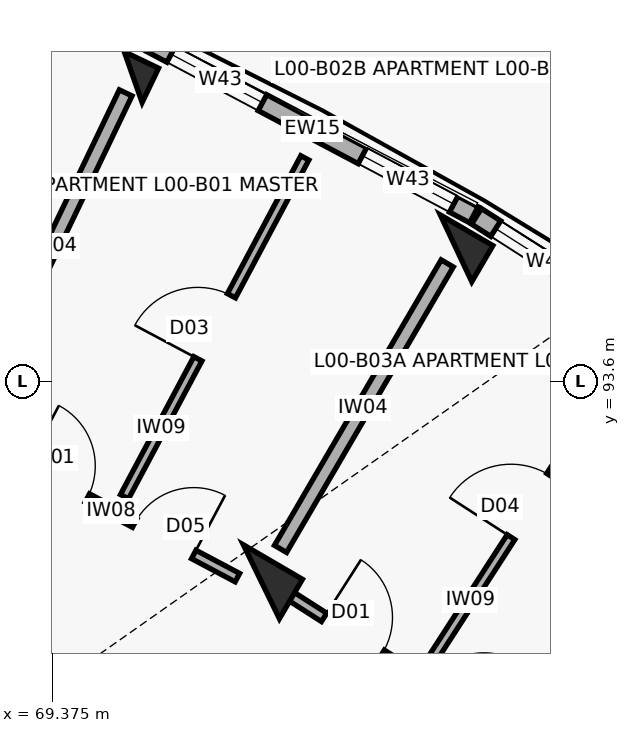
"""IFC4 building model, lengths in metres.
Left out: names, types, materials, properties, quantities, classifications, styles, units other than length and angle.
Written with IfcOpenShell. Run it as: python <this file> out.ifc"""

import sys

from ifc_helpers import new_model, si_unit, direction, frame, frame_2d, origin, origin_2d, place, context, subcontext, project, spatial, rectangle, extrude, element, fill, save


model = new_model("IFC4")
c1 = context("Model", 3, precision=1e-05, world=origin(), true_north=direction((0.0, 1.0)))
c2 = subcontext(c1, "Body", "Model", "MODEL_VIEW")
j1 = project(units=[si_unit("LENGTHUNIT", "METRE"), si_unit("PLANEANGLEUNIT", "RADIAN")], contexts=[c1])
p1 = place(None, origin())
s1 = spatial("IfcSite", under=j1, at=p1, CompositionType="ELEMENT")
p2 = place(p1, origin())
s2 = spatial("IfcBuilding", under=s1, at=p2, CompositionType="ELEMENT")
p3 = place(p2, origin())
s3 = spatial("IfcBuildingStorey", under=s2, at=p3, CompositionType="ELEMENT", Elevation=0.0)
p4 = place(p3, frame((70.441, 97.6, 0.0), z_axis=(0.0, 0.0, 1.0), x_axis=(0.432085748802, 0.901832526405, 0.0)))
e1 = element("IfcColumn", 1, at=p4, inside=s3, PredefinedType="COLUMN", context=c2, shape_type="SweptSolid", body=[
    extrude(rectangle(XDim=0.5, YDim=0.5, at=origin_2d()), origin(), (0.0, 0.0, 1.0), 4.5),
])
p5 = place(p3, frame((72.127, 90.96, 0.0), z_axis=(0.0, 0.0, 1.0), x_axis=(0.504226211181, 0.863571611366, 0.0)))
e2 = element("IfcColumn", 2, at=p5, inside=s3, PredefinedType="COLUMN", context=c2, shape_type="SweptSolid", body=[
    extrude(rectangle(XDim=0.6, YDim=0.9, at=origin_2d()), origin(), (0.0, 0.0, 1.0), 4.5),
])
p6 = place(p3, frame((74.689, 95.347, 0.0), z_axis=(0.0, 0.0, 1.0), x_axis=(0.504226211181, 0.863571611366, 0.0)))
e3 = element("IfcColumn", 3, at=p6, inside=s3, PredefinedType="COLUMN", context=c2, shape_type="SweptSolid", body=[
    extrude(rectangle(XDim=0.55, YDim=0.8, at=origin_2d()), origin(), (0.0, 0.0, 1.0), 4.5),
])
p7 = place(p3, frame((70.675, 98.042, 0.0), z_axis=(0.0, 0.0, 1.0), x_axis=(0.883448093208, -0.468529045639, 0.0)))
e4 = element("IfcWall", 4, at=p7, inside=s3, PredefinedType="SOLIDWALL", context=c2, shape_type="SweptSolid", body=[
    extrude(rectangle(XDim=4.809, YDim=0.238, at=frame_2d((2.405, 0.0))), origin(), (0.0, 0.0, 1.0), 3.45),
])
p8 = place(p7, frame((0.3, 0.0, 0.3)))
e5 = element("IfcOpeningElement", 5, at=p8, cuts=e4, PredefinedType="OPENING", context=c2, shape_type="SweptSolid", body=[
    extrude(rectangle(XDim=1.36, YDim=1.42, at=frame_2d((0.68, 0.71))), frame((0.0, 0.129, 0.0), z_axis=(0.0, -1.0, 0.0), x_axis=(1.0, 0.0, 0.0)), (0.0, 0.0, 1.0), 0.258),
])
p9 = place(p7, frame((3.149, 0.0, 0.3)))
e6 = element("IfcOpeningElement", 6, at=p9, cuts=e4, PredefinedType="OPENING", context=c2, shape_type="SweptSolid", body=[
    extrude(rectangle(XDim=1.36, YDim=1.42, at=frame_2d((0.68, 0.71))), frame((0.0, 0.129, 0.0), z_axis=(0.0, -1.0, 0.0), x_axis=(1.0, 0.0, 0.0)), (0.0, 0.0, 1.0), 0.258),
])
p10 = place(p3, frame((74.958, 95.768, 0.0), z_axis=(0.0, 0.0, 1.0), x_axis=(0.84226218024, -0.539068103061, 0.0)))
e7 = element("IfcWall", 7, at=p10, inside=s3, PredefinedType="SOLIDWALL", context=c2, shape_type="SweptSolid", body=[
    extrude(rectangle(XDim=4.809, YDim=0.242, at=frame_2d((2.404, 0.0))), origin(), (0.0, 0.0, 1.0), 3.45),
])
p11 = place(p10, frame((0.3, 0.0, 0.3)))
e8 = element("IfcOpeningElement", 8, at=p11, cuts=e7, PredefinedType="OPENING", context=c2, shape_type="SweptSolid", body=[
    extrude(rectangle(XDim=1.36, YDim=1.56, at=frame_2d((0.68, 0.78))), frame((0.0, 0.131, 0.0), z_axis=(0.0, -1.0, 0.0), x_axis=(1.0, 0.0, 0.0)), (0.0, 0.0, 1.0), 0.262),
])
p12 = place(p10, frame((3.149, 0.0, 0.3)))
e9 = element("IfcOpeningElement", 9, at=p12, cuts=e7, PredefinedType="OPENING", context=c2, shape_type="SweptSolid", body=[
    extrude(rectangle(XDim=1.36, YDim=1.56, at=frame_2d((0.68, 0.78))), frame((0.0, 0.131, 0.0), z_axis=(0.0, -1.0, 0.0), x_axis=(1.0, 0.0, 0.0)), (0.0, 0.0, 1.0), 0.262),
])
p13 = place(p3, frame((67.194, 90.014, 0.0), z_axis=(0.0, 0.0, 1.0), x_axis=(0.883410853063, -0.468599258099, 0.0)))
e10 = element("IfcWall", 10, at=p13, inside=s3, PredefinedType="SOLIDWALL", context=c2, shape_type="SweptSolid", body=[
    extrude(rectangle(XDim=3.436, YDim=0.2, at=frame_2d((1.718, 0.0))), origin(), (0.0, 0.0, 1.0), 3.34),
])
p14 = place(p13, frame((1.208, 0.0, 0.0)))
e11 = element("IfcOpeningElement", 11, at=p14, cuts=e10, PredefinedType="OPENING", context=c2, shape_type="SweptSolid", body=[
    extrude(rectangle(XDim=1.02, YDim=2.15, at=frame_2d((0.51, 1.075))), frame((0.0, 0.11, 0.0), z_axis=(0.0, -1.0, 0.0), x_axis=(1.0, 0.0, 0.0)), (0.0, 0.0, 1.0), 0.22),
])
p15 = place(p3, frame((68.468, 92.788, 0.0), z_axis=(0.0, 0.0, 1.0), x_axis=(0.883450371448, -0.468524749814, 0.0)))
e12 = element("IfcWall", 12, at=p15, inside=s3, PredefinedType="PARTITIONING", context=c2, shape_type="SweptSolid", body=[
    extrude(rectangle(XDim=3.785, YDim=0.125, at=frame_2d((1.893, 0.0))), origin(), (0.0, 0.0, 1.0), 3.34),
])
p16 = place(p15, frame((0.65, 0.0, 0.0)))
e13 = element("IfcOpeningElement", 13, at=p16, cuts=e12, PredefinedType="OPENING", context=c2, shape_type="SweptSolid", body=[
    extrude(rectangle(XDim=0.9, YDim=2.1, at=frame_2d((0.45, 1.05))), frame((0.0, 0.073, 0.0), z_axis=(0.0, -1.0, 0.0), x_axis=(1.0, 0.0, 0.0)), (0.0, 0.0, 1.0), 0.145),
])
p17 = place(p15, frame((2.255, 0.0, 0.0)))
e14 = element("IfcOpeningElement", 14, at=p17, cuts=e12, PredefinedType="OPENING", context=c2, shape_type="SweptSolid", body=[
    extrude(rectangle(XDim=0.88, YDim=2.1, at=frame_2d((0.44, 1.05))), frame((0.0, 0.073, 0.0), z_axis=(0.0, -1.0, 0.0), x_axis=(1.0, 0.0, 0.0)), (0.0, 0.0, 1.0), 0.145),
])
p18 = place(p3, frame((70.326, 92.079, 0.0), z_axis=(0.0, 0.0, 1.0), x_axis=(0.469847866249, 0.882747405876, 0.0)))
e15 = element("IfcWall", 15, at=p18, inside=s3, PredefinedType="PARTITIONING", context=c2, shape_type="SweptSolid", body=[
    extrude(rectangle(XDim=5.05, YDim=0.12, at=frame_2d((2.525, 0.0))), origin(), (0.0, 0.0, 1.0), 3.34),
])
p19 = place(p18, frame((2.055, 0.0, 0.0)))
e16 = element("IfcOpeningElement", 16, at=p19, cuts=e15, PredefinedType="OPENING", context=c2, shape_type="SweptSolid", body=[
    extrude(rectangle(XDim=0.94, YDim=2.1, at=frame_2d((0.47, 1.05))), frame((0.0, 0.07, 0.0), z_axis=(0.0, -1.0, 0.0), x_axis=(1.0, 0.0, 0.0)), (0.0, 0.0, 1.0), 0.14),
])
p20 = place(p3, frame((68.462, 93.469, 0.0), z_axis=(0.0, 0.0, 1.0), x_axis=(0.432086898897, 0.901831975371, 0.0)))
e17 = element("IfcWall", 17, at=p20, inside=s3, PredefinedType="SOLIDWALL", context=c2, shape_type="SweptSolid", body=[
    extrude(rectangle(XDim=4.35, YDim=0.185, at=frame_2d((2.175, 0.0))), origin(), (0.0, 0.0, 1.0), 3.34),
])
p21 = place(p3, frame((72.405, 90.842, 0.0), z_axis=(0.0, 0.0, 1.0), x_axis=(0.842271400662, -0.539053696423, 0.0)))
e18 = element("IfcWall", 18, at=p21, inside=s3, PredefinedType="PARTITIONING", context=c2, shape_type="SweptSolid", body=[
    extrude(rectangle(XDim=3.797, YDim=0.13, at=frame_2d((1.898, 0.0))), origin(), (0.0, 0.0, 1.0), 3.34),
])
p22 = place(p21, frame((0.65, 0.0, 0.0)))
e19 = element("IfcOpeningElement", 19, at=p22, cuts=e18, PredefinedType="OPENING", context=c2, shape_type="SweptSolid", body=[
    extrude(rectangle(XDim=0.9, YDim=2.1, at=frame_2d((0.45, 1.05))), frame((0.0, 0.075, 0.0), z_axis=(0.0, -1.0, 0.0), x_axis=(1.0, 0.0, 0.0)), (0.0, 0.0, 1.0), 0.15),
])
p23 = place(p21, frame((2.267, 0.0, 0.0)))
e20 = element("IfcOpeningElement", 20, at=p23, cuts=e18, PredefinedType="OPENING", context=c2, shape_type="SweptSolid", body=[
    extrude(rectangle(XDim=0.88, YDim=2.1, at=frame_2d((0.44, 1.05))), frame((0.0, 0.075, 0.0), z_axis=(0.0, -1.0, 0.0), x_axis=(1.0, 0.0, 0.0)), (0.0, 0.0, 1.0), 0.15),
])
p24 = place(p3, frame((74.342, 89.892, 0.0), z_axis=(0.0, 0.0, 1.0), x_axis=(0.542871109654, 0.839816026462, 0.0)))
e21 = element("IfcWall", 21, at=p24, inside=s3, PredefinedType="PARTITIONING", context=c2, shape_type="SweptSolid", body=[
    extrude(rectangle(XDim=4.9, YDim=0.12, at=frame_2d((2.45, 0.0))), origin(), (0.0, 0.0, 1.0), 3.34),
])
p25 = place(p24, frame((1.97, 0.0, 0.0)))
e22 = element("IfcOpeningElement", 22, at=p25, cuts=e21, PredefinedType="OPENING", context=c2, shape_type="SweptSolid", body=[
    extrude(rectangle(XDim=0.96, YDim=2.1, at=frame_2d((0.48, 1.05))), frame((0.0, 0.07, 0.0), z_axis=(0.0, -1.0, 0.0), x_axis=(1.0, 0.0, 0.0)), (0.0, 0.0, 1.0), 0.14),
])
p26 = place(p3, frame((72.379, 91.392, 0.0), z_axis=(0.0, 0.0, 1.0), x_axis=(0.504216452091, 0.863577309475, 0.0)))
e23 = element("IfcWall", 23, at=p26, inside=s3, PredefinedType="SOLIDWALL", context=c2, shape_type="SweptSolid", body=[
    extrude(rectangle(XDim=4.35, YDim=0.185, at=frame_2d((2.175, 0.0))), origin(), (0.0, 0.0, 1.0), 3.34),
])
p27 = place(p8, origin())
e24 = element("IfcWindow", 24, at=p27, inside=s3, PartitioningType="DOUBLE_PANEL_VERTICAL", PredefinedType="WINDOW", context=c2, shape_type="SweptSolid", body=[
    extrude(rectangle(XDim=1.36, YDim=1.42, at=frame_2d((0.68, 0.71))), frame((0.0, 0.03, 0.0), z_axis=(0.0, -1.0, 0.0), x_axis=(1.0, 0.0, 0.0)), (0.0, 0.0, 1.0), 0.06),
])
fill(e5, e24)
p28 = place(p9, origin())
e25 = element("IfcWindow", 25, at=p28, inside=s3, PartitioningType="DOUBLE_PANEL_VERTICAL", PredefinedType="WINDOW", context=c2, shape_type="SweptSolid", body=[
    extrude(rectangle(XDim=1.36, YDim=1.42, at=frame_2d((0.68, 0.71))), frame((0.0, 0.03, 0.0), z_axis=(0.0, -1.0, 0.0), x_axis=(1.0, 0.0, 0.0)), (0.0, 0.0, 1.0), 0.06),
])
fill(e6, e25)
p29 = place(p11, origin())
e26 = element("IfcWindow", 26, at=p29, inside=s3, PartitioningType="DOUBLE_PANEL_VERTICAL", PredefinedType="WINDOW", context=c2, shape_type="SweptSolid", body=[
    extrude(rectangle(XDim=1.36, YDim=1.56, at=frame_2d((0.68, 0.78))), frame((0.0, 0.03, 0.0), z_axis=(0.0, -1.0, 0.0), x_axis=(1.0, 0.0, 0.0)), (0.0, 0.0, 1.0), 0.06),
])
fill(e8, e26)
p30 = place(p16, origin())
e27 = element("IfcDoor", 27, at=p30, inside=s3, OperationType="SINGLE_SWING_LEFT", PredefinedType="DOOR", context=c2, shape_type="SweptSolid", body=[
    extrude(rectangle(XDim=0.9, YDim=2.1, at=frame_2d((0.45, 1.05))), frame((0.0, 0.025, 0.0), z_axis=(0.0, -1.0, 0.0), x_axis=(1.0, 0.0, 0.0)), (0.0, 0.0, 1.0), 0.05),
])
fill(e13, e27)
p31 = place(p17, origin())
e28 = element("IfcDoor", 28, at=p31, inside=s3, OperationType="SINGLE_SWING_RIGHT", PredefinedType="DOOR", context=c2, shape_type="SweptSolid", body=[
    extrude(rectangle(XDim=0.88, YDim=2.1, at=frame_2d((0.44, 1.05))), frame((0.0, 0.025, 0.0), z_axis=(0.0, -1.0, 0.0), x_axis=(1.0, 0.0, 0.0)), (0.0, 0.0, 1.0), 0.05),
])
fill(e14, e28)
p32 = place(p19, origin())
e29 = element("IfcDoor", 29, at=p32, inside=s3, OperationType="SINGLE_SWING_LEFT", PredefinedType="DOOR", context=c2, shape_type="SweptSolid", body=[
    extrude(rectangle(XDim=0.94, YDim=2.1, at=frame_2d((0.47, 1.05))), frame((0.0, 0.025, 0.0), z_axis=(0.0, -1.0, 0.0), x_axis=(1.0, 0.0, 0.0)), (0.0, 0.0, 1.0), 0.05),
])
fill(e16, e29)
p33 = place(p22, origin())
e30 = element("IfcDoor", 30, at=p33, inside=s3, OperationType="SINGLE_SWING_LEFT", PredefinedType="DOOR", context=c2, shape_type="SweptSolid", body=[
    extrude(rectangle(XDim=0.9, YDim=2.1, at=frame_2d((0.45, 1.05))), frame((0.0, 0.025, 0.0), z_axis=(0.0, -1.0, 0.0), x_axis=(1.0, 0.0, 0.0)), (0.0, 0.0, 1.0), 0.05),
])
fill(e19, e30)
p34 = place(p25, origin())
e31 = element("IfcDoor", 31, at=p34, inside=s3, OperationType="SINGLE_SWING_LEFT", PredefinedType="DOOR", context=c2, shape_type="SweptSolid", body=[
    extrude(rectangle(XDim=0.96, YDim=2.1, at=frame_2d((0.48, 1.05))), frame((0.0, 0.025, 0.0), z_axis=(0.0, -1.0, 0.0), x_axis=(1.0, 0.0, 0.0)), (0.0, 0.0, 1.0), 0.05),
])
fill(e22, e31)
save(model, sys.argv[1])
